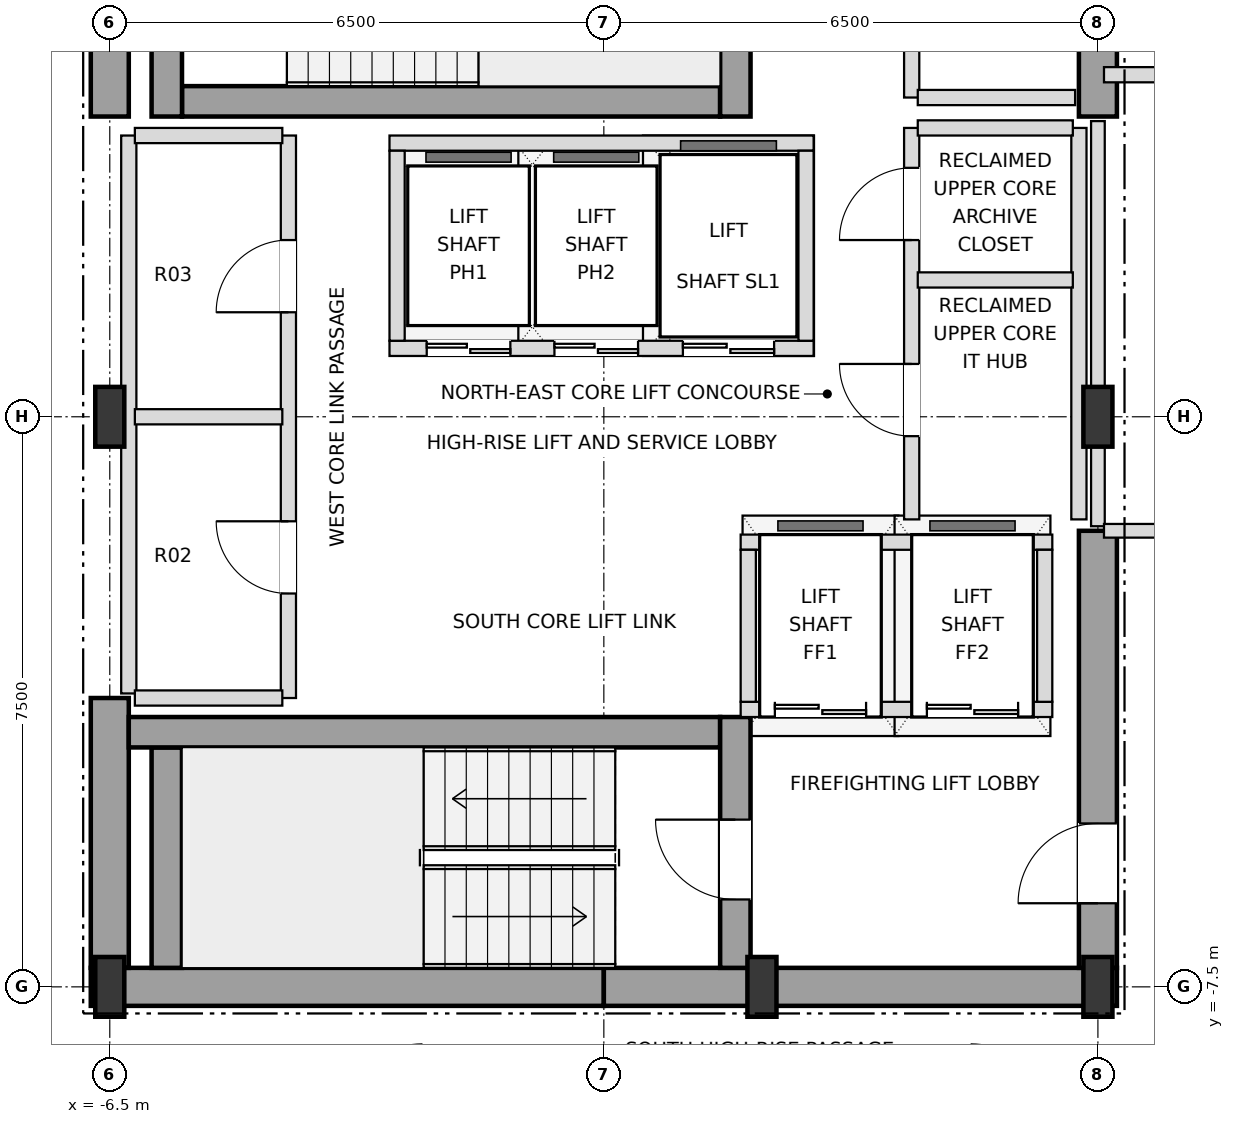
"""IFC4 building model, lengths in metres.
Left out: names, types, materials, properties, quantities, classifications, styles, units other than length and angle.
Written with IfcOpenShell. Run it as: python <this file> out.ifc"""

import sys

from ifc_helpers import new_model, si_unit, direction, frame, frame_2d, origin, origin_2d, place, context, subcontext, project, spatial, rectangle, i_section, extrude, element, fill, save


model = new_model("IFC4")
c1 = context("Model", 3, precision=1e-05, world=origin(), true_north=direction((0.0, 1.0)))
c2 = subcontext(c1, "Body", "Model", "MODEL_VIEW")
j1 = project(units=[si_unit("LENGTHUNIT", "METRE"), si_unit("PLANEANGLEUNIT", "RADIAN")], contexts=[c1])
p1 = place(None, origin())
s1 = spatial("IfcSite", under=j1, at=p1, CompositionType="ELEMENT")
p2 = place(p1, origin())
s2 = spatial("IfcBuilding", under=s1, at=p2, CompositionType="ELEMENT")
p3 = place(p2, frame((0.0, 0.0, 301.5)))
s3 = spatial("IfcBuildingStorey", under=s2, at=p3, CompositionType="ELEMENT", Elevation=301.5)
for number, where, z_axis, x_axis in (
    (1, (-6.5, -7.5, 0.0), (0.0, 0.0, 1.0), (1.0, 0.0, 0.0)),
    (2, (2.08, -7.5, 0.0), (0.0, 0.0, 1.0), (1.0, 0.0, 0.0)),
    (3, (6.5, -7.5, 0.0), (0.0, 0.0, 1.0), (1.0, 0.0, 0.0)),
    (4, (-6.5, 0.0, 0.0), (0.0, 0.0, 1.0), (1.0, 0.0, 0.0)),
    (5, (6.5, 0.0, 0.0), (0.0, 0.0, 1.0), (1.0, 0.0, 0.0)),
):
    element("IfcColumn", number, at=place(p3, frame(where, z_axis=z_axis, x_axis=x_axis)), inside=s3, PredefinedType="COLUMN", context=c2, shape_type="SweptSolid", body=[
        extrude(i_section(OverallWidth=0.382, OverallDepth=0.786, WebThickness=0.02, FlangeThickness=0.033, at=origin_2d()), origin(), (0.0, 0.0, 1.0), 3.6),
    ])
for number, where, z_axis, x_axis in (
    (6, (-6.75, -7.5, 0.0), (0.0, 0.0, 1.0), (1.0, 0.0, 0.0)),
    (7, (0.0, -7.5, 0.0), (0.0, 0.0, 1.0), (1.0, 0.0, 0.0)),
):
    element("IfcWall", number, at=place(p3, frame(where, z_axis=z_axis, x_axis=x_axis)), inside=s3, PredefinedType="SHEAR", context=c2, shape_type="SweptSolid", body=[
        extrude(rectangle(XDim=6.75, YDim=0.5, at=frame_2d((3.375, 0.0))), origin(), (0.0, 0.0, 1.0), 3.3),
    ])
p4 = place(p3, frame((-6.5, -7.25, 0.0), z_axis=(0.0, 0.0, 1.0), x_axis=(0.0, 1.0, 0.0)))
e8 = element("IfcWall", 8, at=p4, inside=s3, PredefinedType="SHEAR", context=c2, shape_type="SweptSolid", body=[
    extrude(rectangle(XDim=3.55, YDim=0.5, at=frame_2d((1.775, 0.0))), origin(), (0.0, 0.0, 1.0), 3.3),
])
p5 = place(p3, frame((-6.5, 3.95, 0.0), z_axis=(0.0, 0.0, 1.0), x_axis=(0.0, 1.0, 0.0)))
e9 = element("IfcWall", 9, at=p5, inside=s3, PredefinedType="SHEAR", context=c2, shape_type="SweptSolid", body=[
    extrude(rectangle(XDim=3.3, YDim=0.5, at=frame_2d((1.65, 0.0))), origin(), (0.0, 0.0, 1.0), 3.3),
])
p6 = place(p3, frame((6.5, -7.25, 0.0), z_axis=(0.0, 0.0, 1.0), x_axis=(0.0, 1.0, 0.0)))
e10 = element("IfcWall", 10, at=p6, inside=s3, PredefinedType="SHEAR", context=c2, shape_type="SweptSolid", body=[
    extrude(rectangle(XDim=5.75, YDim=0.5, at=frame_2d((2.875, 0.0))), origin(), (0.0, 0.0, 1.0), 3.3),
])
p7 = place(p6, frame((0.85, 0.0, 0.0)))
e11 = element("IfcOpeningElement", 11, at=p7, cuts=e10, PredefinedType="OPENING", context=c2, shape_type="SweptSolid", body=[
    extrude(rectangle(XDim=1.05, YDim=2.15, at=frame_2d((0.525, 1.075))), frame((0.0, 0.26, 0.0), z_axis=(0.0, -1.0, 0.0), x_axis=(1.0, 0.0, 0.0)), (0.0, 0.0, 1.0), 0.52),
])
p8 = place(p3, frame((6.5, 3.95, 0.0), z_axis=(0.0, 0.0, 1.0), x_axis=(0.0, 1.0, 0.0)))
e12 = element("IfcWall", 12, at=p8, inside=s3, PredefinedType="SHEAR", context=c2, shape_type="SweptSolid", body=[
    extrude(rectangle(XDim=3.3, YDim=0.5, at=frame_2d((1.65, 0.0))), origin(), (0.0, 0.0, 1.0), 3.3),
])
p9 = place(p3, frame((-5.75, -7.25, 0.0), z_axis=(0.0, 0.0, 1.0), x_axis=(0.0, 1.0, 0.0)))
e13 = element("IfcWall", 13, at=p9, inside=s3, PredefinedType="SHEAR", context=c2, shape_type="SweptSolid", body=[
    extrude(rectangle(XDim=2.9, YDim=0.4, at=frame_2d((1.45, 0.0))), origin(), (0.0, 0.0, 1.0), 3.3),
])
p10 = place(p3, frame((-6.25, -4.15, 0.0), z_axis=(0.0, 0.0, 1.0), x_axis=(1.0, 0.0, 0.0)))
e14 = element("IfcWall", 14, at=p10, inside=s3, PredefinedType="SHEAR", context=c2, shape_type="SweptSolid", body=[
    extrude(rectangle(XDim=7.78, YDim=0.4, at=frame_2d((3.89, 0.0))), origin(), (0.0, 0.0, 1.0), 3.3),
])
p11 = place(p3, frame((1.73, -7.25, 0.0), z_axis=(0.0, 0.0, 1.0), x_axis=(0.0, 1.0, 0.0)))
e15 = element("IfcWall", 15, at=p11, inside=s3, PredefinedType="SHEAR", context=c2, shape_type="SweptSolid", body=[
    extrude(rectangle(XDim=3.3, YDim=0.4, at=frame_2d((1.65, 0.0))), origin(), (0.0, 0.0, 1.0), 3.3),
])
p12 = place(p11, frame((0.9, 0.0, 0.0)))
e16 = element("IfcOpeningElement", 16, at=p12, cuts=e15, PredefinedType="OPENING", context=c2, shape_type="SweptSolid", body=[
    extrude(rectangle(XDim=1.05, YDim=2.15, at=frame_2d((0.525, 1.075))), frame((0.0, 0.21, 0.0), z_axis=(0.0, -1.0, 0.0), x_axis=(1.0, 0.0, 0.0)), (0.0, 0.0, 1.0), 0.42),
])
p13 = place(p3, frame((-5.55, 4.15, 0.0), z_axis=(0.0, 0.0, 1.0), x_axis=(1.0, 0.0, 0.0)))
e17 = element("IfcWall", 17, at=p13, inside=s3, PredefinedType="SHEAR", context=c2, shape_type="SweptSolid", body=[
    extrude(rectangle(XDim=7.08, YDim=0.4, at=frame_2d((3.54, 0.0))), origin(), (0.0, 0.0, 1.0), 3.3),
])
for number, where, z_axis, x_axis in (
    (18, (1.73, 3.95, 0.0), (0.0, 0.0, 1.0), (0.0, 1.0, 0.0)),
    (19, (-5.75, 3.95, 0.0), (0.0, 0.0, 1.0), (0.0, 1.0, 0.0)),
):
    element("IfcWall", number, at=place(p3, frame(where, z_axis=z_axis, x_axis=x_axis)), inside=s3, PredefinedType="SHEAR", context=c2, shape_type="SweptSolid", body=[
        extrude(rectangle(XDim=3.3, YDim=0.4, at=frame_2d((1.65, 0.0))), origin(), (0.0, 0.0, 1.0), 3.3),
    ])
p14 = place(p3, frame((-2.82, 0.9, 0.0), z_axis=(0.0, 0.0, 1.0), x_axis=(1.0, 0.0, 0.0)))
e20 = element("IfcWall", 20, at=p14, inside=s3, PredefinedType="SOLIDWALL", context=c2, shape_type="SweptSolid", body=[
    extrude(rectangle(XDim=5.58, YDim=0.2, at=frame_2d((2.79, 0.0))), origin(), (0.0, 0.0, 1.0), 3.3),
])
p15 = place(p14, frame((0.49, 0.0, 0.0)))
e21 = element("IfcOpeningElement", 21, at=p15, cuts=e20, PredefinedType="OPENING", context=c2, shape_type="SweptSolid", body=[
    extrude(rectangle(XDim=1.1, YDim=2.15, at=frame_2d((0.55, 1.075))), frame((0.0, 0.11, 0.0), z_axis=(0.0, -1.0, 0.0), x_axis=(1.0, 0.0, 0.0)), (0.0, 0.0, 1.0), 0.22),
])
p16 = place(p14, frame((2.17, 0.0, 0.0)))
e22 = element("IfcOpeningElement", 22, at=p16, cuts=e20, PredefinedType="OPENING", context=c2, shape_type="SweptSolid", body=[
    extrude(rectangle(XDim=1.1, YDim=2.15, at=frame_2d((0.55, 1.075))), frame((0.0, 0.11, 0.0), z_axis=(0.0, -1.0, 0.0), x_axis=(1.0, 0.0, 0.0)), (0.0, 0.0, 1.0), 0.22),
])
p17 = place(p14, frame((3.86, 0.0, 0.0)))
e23 = element("IfcOpeningElement", 23, at=p17, cuts=e20, PredefinedType="OPENING", context=c2, shape_type="SweptSolid", body=[
    extrude(rectangle(XDim=1.2, YDim=2.2, at=frame_2d((0.6, 1.1))), frame((0.0, 0.11, 0.0), z_axis=(0.0, -1.0, 0.0), x_axis=(1.0, 0.0, 0.0)), (0.0, 0.0, 1.0), 0.22),
])
p18 = place(p3, frame((-2.82, 3.6, 0.0), z_axis=(0.0, 0.0, 1.0), x_axis=(1.0, 0.0, 0.0)))
e24 = element("IfcWall", 24, at=p18, inside=s3, PredefinedType="SOLIDWALL", context=c2, shape_type="SweptSolid", body=[
    extrude(rectangle(XDim=5.58, YDim=0.2, at=frame_2d((2.79, 0.0))), origin(), (0.0, 0.0, 1.0), 3.3),
])
for number, where, z_axis, x_axis in (
    (25, (-2.72, 1.0, 0.0), (0.0, 0.0, 1.0), (0.0, 1.0, 0.0)),
    (26, (2.66, 1.0, 0.0), (0.0, 0.0, 1.0), (0.0, 1.0, 0.0)),
):
    element("IfcWall", number, at=place(p3, frame(where, z_axis=z_axis, x_axis=x_axis)), inside=s3, PredefinedType="SOLIDWALL", context=c2, shape_type="SweptSolid", body=[
        extrude(rectangle(XDim=2.5, YDim=0.2, at=frame_2d((1.25, 0.0))), origin(), (0.0, 0.0, 1.0), 3.3),
    ])
p19 = place(p3, frame((1.8, -3.85, 0.0), z_axis=(0.0, 0.0, 1.0), x_axis=(1.0, 0.0, 0.0)))
e27 = element("IfcWall", 27, at=p19, inside=s3, PredefinedType="SOLIDWALL", context=c2, shape_type="SweptSolid", body=[
    extrude(rectangle(XDim=4.1, YDim=0.2, at=frame_2d((2.05, 0.0))), origin(), (0.0, 0.0, 1.0), 3.3),
])
p20 = place(p19, frame((0.45, 0.0, 0.0)))
e28 = element("IfcOpeningElement", 28, at=p20, cuts=e27, PredefinedType="OPENING", context=c2, shape_type="SweptSolid", body=[
    extrude(rectangle(XDim=1.2, YDim=2.2, at=frame_2d((0.6, 1.1))), frame((0.0, 0.11, 0.0), z_axis=(0.0, -1.0, 0.0), x_axis=(1.0, 0.0, 0.0)), (0.0, 0.0, 1.0), 0.22),
])
p21 = place(p19, frame((2.45, 0.0, 0.0)))
e29 = element("IfcOpeningElement", 29, at=p21, cuts=e27, PredefinedType="OPENING", context=c2, shape_type="SweptSolid", body=[
    extrude(rectangle(XDim=1.2, YDim=2.2, at=frame_2d((0.6, 1.1))), frame((0.0, 0.11, 0.0), z_axis=(0.0, -1.0, 0.0), x_axis=(1.0, 0.0, 0.0)), (0.0, 0.0, 1.0), 0.22),
])
p22 = place(p3, frame((1.8, -1.65, 0.0), z_axis=(0.0, 0.0, 1.0), x_axis=(1.0, 0.0, 0.0)))
e30 = element("IfcWall", 30, at=p22, inside=s3, PredefinedType="SOLIDWALL", context=c2, shape_type="SweptSolid", body=[
    extrude(rectangle(XDim=4.1, YDim=0.2, at=frame_2d((2.05, 0.0))), origin(), (0.0, 0.0, 1.0), 3.3),
])
for number, where, z_axis, x_axis in (
    (31, (1.9, -3.75, 0.0), (0.0, 0.0, 1.0), (0.0, 1.0, 0.0)),
    (32, (5.8, -3.75, 0.0), (0.0, 0.0, 1.0), (0.0, 1.0, 0.0)),
):
    element("IfcWall", number, at=place(p3, frame(where, z_axis=z_axis, x_axis=x_axis)), inside=s3, PredefinedType="SOLIDWALL", context=c2, shape_type="SweptSolid", body=[
        extrude(rectangle(XDim=2.0, YDim=0.2, at=frame_2d((1.0, 0.0))), origin(), (0.0, 0.0, 1.0), 3.3),
    ])
p23 = place(p3, frame((-6.25, -3.64, 0.0), z_axis=(0.0, 0.0, 1.0), x_axis=(0.0, 1.0, 0.0)))
e33 = element("IfcWall", 33, at=p23, inside=s3, PredefinedType="SOLIDWALL", context=c2, shape_type="SweptSolid", body=[
    extrude(rectangle(XDim=7.34, YDim=0.2, at=frame_2d((3.67, 0.0))), origin(), (0.0, 0.0, 1.0), 2.353),
])
p24 = place(p3, frame((-4.15, -3.7, 0.0), z_axis=(0.0, 0.0, 1.0), x_axis=(0.0, 1.0, 0.0)))
e34 = element("IfcWall", 34, at=p24, inside=s3, PredefinedType="SOLIDWALL", context=c2, shape_type="SweptSolid", body=[
    extrude(rectangle(XDim=7.4, YDim=0.2, at=frame_2d((3.7, 0.0))), origin(), (0.0, 0.0, 1.0), 3.3),
])
p25 = place(p24, frame((1.375, 0.0, 0.0)))
e35 = element("IfcOpeningElement", 35, at=p25, cuts=e34, PredefinedType="OPENING", context=c2, shape_type="SweptSolid", body=[
    extrude(rectangle(XDim=0.95, YDim=2.15, at=frame_2d((0.475, 1.075))), frame((0.0, 0.11, 0.0), z_axis=(0.0, -1.0, 0.0), x_axis=(1.0, 0.0, 0.0)), (0.0, 0.0, 1.0), 0.22),
])
p26 = place(p24, frame((5.075, 0.0, 0.0)))
e36 = element("IfcOpeningElement", 36, at=p26, cuts=e34, PredefinedType="OPENING", context=c2, shape_type="SweptSolid", body=[
    extrude(rectangle(XDim=0.95, YDim=2.15, at=frame_2d((0.475, 1.075))), frame((0.0, 0.11, 0.0), z_axis=(0.0, -1.0, 0.0), x_axis=(1.0, 0.0, 0.0)), (0.0, 0.0, 1.0), 0.22),
])
p27 = place(p3, frame((4.05, -1.35, 0.0), z_axis=(0.0, 0.0, 1.0), x_axis=(0.0, 1.0, 0.0)))
e37 = element("IfcWall", 37, at=p27, inside=s3, PredefinedType="SOLIDWALL", context=c2, shape_type="SweptSolid", body=[
    extrude(rectangle(XDim=5.15, YDim=0.2, at=frame_2d((2.575, 0.0))), origin(), (0.0, 0.0, 1.0), 3.3),
])
p28 = place(p27, frame((1.095, 0.0, 0.0)))
e38 = element("IfcOpeningElement", 38, at=p28, cuts=e37, PredefinedType="OPENING", context=c2, shape_type="SweptSolid", body=[
    extrude(rectangle(XDim=0.95, YDim=2.15, at=frame_2d((0.475, 1.075))), frame((0.0, 0.11, 0.0), z_axis=(0.0, -1.0, 0.0), x_axis=(1.0, 0.0, 0.0)), (0.0, 0.0, 1.0), 0.22),
])
p29 = place(p27, frame((3.675, 0.0, 0.0)))
e39 = element("IfcOpeningElement", 39, at=p29, cuts=e37, PredefinedType="OPENING", context=c2, shape_type="SweptSolid", body=[
    extrude(rectangle(XDim=0.95, YDim=2.15, at=frame_2d((0.475, 1.075))), frame((0.0, 0.11, 0.0), z_axis=(0.0, -1.0, 0.0), x_axis=(1.0, 0.0, 0.0)), (0.0, 0.0, 1.0), 0.22),
])
p30 = place(p3, frame((4.05, 4.2, 0.0), z_axis=(0.0, 0.0, 1.0), x_axis=(0.0, 1.0, 0.0)))
e40 = element("IfcWall", 40, at=p30, inside=s3, PredefinedType="SOLIDWALL", context=c2, shape_type="SweptSolid", body=[
    extrude(rectangle(XDim=3.05, YDim=0.2, at=frame_2d((1.525, 0.0))), origin(), (0.0, 0.0, 1.0), 3.3),
])
p31 = place(p30, frame((0.975, 0.0, 0.0)))
e41 = element("IfcOpeningElement", 41, at=p31, cuts=e40, PredefinedType="OPENING", context=c2, shape_type="SweptSolid", body=[
    extrude(rectangle(XDim=0.95, YDim=2.15, at=frame_2d((0.475, 1.075))), frame((0.0, 0.11, 0.0), z_axis=(0.0, -1.0, 0.0), x_axis=(1.0, 0.0, 0.0)), (0.0, 0.0, 1.0), 0.22),
])
p32 = place(p3, frame((6.25, -1.35, 0.0), z_axis=(0.0, 0.0, 1.0), x_axis=(0.0, 1.0, 0.0)))
e42 = element("IfcWall", 42, at=p32, inside=s3, PredefinedType="SOLIDWALL", context=c2, shape_type="SweptSolid", body=[
    extrude(rectangle(XDim=5.15, YDim=0.2, at=frame_2d((2.575, 0.0))), origin(), (0.0, 0.0, 1.0), 2.353),
])
p33 = place(p3, frame((6.5, -1.44, 0.0), z_axis=(0.0, 0.0, 1.0), x_axis=(0.0, 1.0, 0.0)))
e43 = element("IfcWall", 43, at=p33, inside=s3, PredefinedType="PARTITIONING", context=c2, shape_type="SweptSolid", body=[
    extrude(rectangle(XDim=5.33, YDim=0.18, at=frame_2d((2.665, 0.0))), origin(), (0.0, 0.0, 1.0), 2.353),
])
p34 = place(p3, frame((-6.17, -3.7, 0.0), z_axis=(0.0, 0.0, 1.0), x_axis=(1.0, 0.0, 0.0)))
e44 = element("IfcWall", 44, at=p34, inside=s3, PredefinedType="SOLIDWALL", context=c2, shape_type="SweptSolid", body=[
    extrude(rectangle(XDim=1.94, YDim=0.2, at=frame_2d((0.97, 0.0))), origin(), (0.0, 0.0, 1.0), 3.3),
])
p35 = place(p3, frame((6.58, -1.5, 0.0), z_axis=(0.0, 0.0, 1.0), x_axis=(1.0, 0.0, 0.0)))
e45 = element("IfcWall", 45, at=p35, inside=s3, PredefinedType="PARTITIONING", context=c2, shape_type="SweptSolid", body=[
    extrude(rectangle(XDim=1.64, YDim=0.18, at=frame_2d((0.82, 0.0))), origin(), (0.0, 0.0, 1.0), 3.3),
])
p36 = place(p3, frame((-6.17, 0.0, 0.0), z_axis=(0.0, 0.0, 1.0), x_axis=(1.0, 0.0, 0.0)))
e46 = element("IfcWall", 46, at=p36, inside=s3, PredefinedType="SOLIDWALL", context=c2, shape_type="SweptSolid", body=[
    extrude(rectangle(XDim=1.94, YDim=0.2, at=frame_2d((0.97, 0.0))), origin(), (0.0, 0.0, 1.0), 3.3),
])
p37 = place(p3, frame((4.13, 1.8, 0.0), z_axis=(0.0, 0.0, 1.0), x_axis=(1.0, 0.0, 0.0)))
e47 = element("IfcWall", 47, at=p37, inside=s3, PredefinedType="SOLIDWALL", context=c2, shape_type="SweptSolid", body=[
    extrude(rectangle(XDim=2.04, YDim=0.2, at=frame_2d((1.02, 0.0))), origin(), (0.0, 0.0, 1.0), 3.3),
])
p38 = place(p3, frame((-6.17, 3.7, 0.0), z_axis=(0.0, 0.0, 1.0), x_axis=(1.0, 0.0, 0.0)))
e48 = element("IfcWall", 48, at=p38, inside=s3, PredefinedType="SOLIDWALL", context=c2, shape_type="SweptSolid", body=[
    extrude(rectangle(XDim=1.94, YDim=0.2, at=frame_2d((0.97, 0.0))), origin(), (0.0, 0.0, 1.0), 3.3),
])
p39 = place(p3, frame((4.13, 3.8, 0.0), z_axis=(0.0, 0.0, 1.0), x_axis=(1.0, 0.0, 0.0)))
e49 = element("IfcWall", 49, at=p39, inside=s3, PredefinedType="SOLIDWALL", context=c2, shape_type="SweptSolid", body=[
    extrude(rectangle(XDim=2.04, YDim=0.2, at=frame_2d((1.02, 0.0))), origin(), (0.0, 0.0, 1.0), 3.3),
])
p40 = place(p3, frame((4.13, 4.2, 0.0), z_axis=(0.0, 0.0, 1.0), x_axis=(1.0, 0.0, 0.0)))
e50 = element("IfcWall", 50, at=p40, inside=s3, PredefinedType="SOLIDWALL", context=c2, shape_type="SweptSolid", body=[
    extrude(rectangle(XDim=2.07, YDim=0.2, at=frame_2d((1.035, 0.0))), origin(), (0.0, 0.0, 1.0), 3.3),
])
p41 = place(p3, frame((6.58, 4.5, 0.0), z_axis=(0.0, 0.0, 1.0), x_axis=(1.0, 0.0, 0.0)))
e51 = element("IfcWall", 51, at=p41, inside=s3, PredefinedType="SOLIDWALL", context=c2, shape_type="SweptSolid", body=[
    extrude(rectangle(XDim=4.74, YDim=0.2, at=frame_2d((2.37, 0.0))), origin(), (0.0, 0.0, 1.0), 3.3),
])
p42 = place(p41, frame((1.845, 0.0, 0.0)))
e52 = element("IfcOpeningElement", 52, at=p42, cuts=e51, PredefinedType="OPENING", context=c2, shape_type="SweptSolid", body=[
    extrude(rectangle(XDim=0.95, YDim=2.15, at=frame_2d((0.475, 1.075))), frame((0.0, 0.11, 0.0), z_axis=(0.0, -1.0, 0.0), x_axis=(1.0, 0.0, 0.0)), (0.0, 0.0, 1.0), 0.22),
])
p43 = place(p7, origin())
e53 = element("IfcDoor", 53, at=p43, inside=s3, OperationType="SINGLE_SWING_LEFT", PredefinedType="DOOR", context=c2, shape_type="SweptSolid", body=[
    extrude(rectangle(XDim=1.05, YDim=2.15, at=frame_2d((0.525, 1.075))), frame((0.0, 0.025, 0.0), z_axis=(0.0, -1.0, 0.0), x_axis=(1.0, 0.0, 0.0)), (0.0, 0.0, 1.0), 0.05),
])
fill(e11, e53)
p44 = place(p12, origin())
e54 = element("IfcDoor", 54, at=p44, inside=s3, OperationType="SINGLE_SWING_RIGHT", PredefinedType="DOOR", context=c2, shape_type="SweptSolid", body=[
    extrude(rectangle(XDim=1.05, YDim=2.15, at=frame_2d((0.525, 1.075))), frame((0.0, 0.025, 0.0), z_axis=(0.0, -1.0, 0.0), x_axis=(1.0, 0.0, 0.0)), (0.0, 0.0, 1.0), 0.05),
])
fill(e16, e54)
p45 = place(p15, origin())
e55 = element("IfcDoor", 55, at=p45, inside=s3, OperationType="DOUBLE_DOOR_SLIDING", PredefinedType="DOOR", context=c2, shape_type="SweptSolid", body=[
    extrude(rectangle(XDim=1.1, YDim=2.15, at=frame_2d((0.55, 1.075))), frame((0.0, 0.025, 0.0), z_axis=(0.0, -1.0, 0.0), x_axis=(1.0, 0.0, 0.0)), (0.0, 0.0, 1.0), 0.05),
])
fill(e21, e55)
p46 = place(p16, origin())
e56 = element("IfcDoor", 56, at=p46, inside=s3, OperationType="DOUBLE_DOOR_SLIDING", PredefinedType="DOOR", context=c2, shape_type="SweptSolid", body=[
    extrude(rectangle(XDim=1.1, YDim=2.15, at=frame_2d((0.55, 1.075))), frame((0.0, 0.025, 0.0), z_axis=(0.0, -1.0, 0.0), x_axis=(1.0, 0.0, 0.0)), (0.0, 0.0, 1.0), 0.05),
])
fill(e22, e56)
p47 = place(p17, origin())
e57 = element("IfcDoor", 57, at=p47, inside=s3, OperationType="DOUBLE_DOOR_SLIDING", PredefinedType="DOOR", context=c2, shape_type="SweptSolid", body=[
    extrude(rectangle(XDim=1.2, YDim=2.2, at=frame_2d((0.6, 1.1))), frame((0.0, 0.025, 0.0), z_axis=(0.0, -1.0, 0.0), x_axis=(1.0, 0.0, 0.0)), (0.0, 0.0, 1.0), 0.05),
])
fill(e23, e57)
p48 = place(p20, origin())
e58 = element("IfcDoor", 58, at=p48, inside=s3, OperationType="DOUBLE_DOOR_SLIDING", PredefinedType="DOOR", context=c2, shape_type="SweptSolid", body=[
    extrude(rectangle(XDim=1.2, YDim=2.2, at=frame_2d((0.6, 1.1))), frame((0.0, 0.025, 0.0), z_axis=(0.0, -1.0, 0.0), x_axis=(1.0, 0.0, 0.0)), (0.0, 0.0, 1.0), 0.05),
])
fill(e28, e58)
p49 = place(p21, origin())
e59 = element("IfcDoor", 59, at=p49, inside=s3, OperationType="DOUBLE_DOOR_SLIDING", PredefinedType="DOOR", context=c2, shape_type="SweptSolid", body=[
    extrude(rectangle(XDim=1.2, YDim=2.2, at=frame_2d((0.6, 1.1))), frame((0.0, 0.025, 0.0), z_axis=(0.0, -1.0, 0.0), x_axis=(1.0, 0.0, 0.0)), (0.0, 0.0, 1.0), 0.05),
])
fill(e29, e59)
p50 = place(p25, origin())
e60 = element("IfcDoor", 60, at=p50, inside=s3, OperationType="SINGLE_SWING_RIGHT", PredefinedType="DOOR", context=c2, shape_type="SweptSolid", body=[
    extrude(rectangle(XDim=0.95, YDim=2.15, at=frame_2d((0.475, 1.075))), frame((0.0, 0.025, 0.0), z_axis=(0.0, -1.0, 0.0), x_axis=(1.0, 0.0, 0.0)), (0.0, 0.0, 1.0), 0.05),
])
fill(e35, e60)
p51 = place(p26, origin())
e61 = element("IfcDoor", 61, at=p51, inside=s3, OperationType="SINGLE_SWING_LEFT", PredefinedType="DOOR", context=c2, shape_type="SweptSolid", body=[
    extrude(rectangle(XDim=0.95, YDim=2.15, at=frame_2d((0.475, 1.075))), frame((0.0, 0.025, 0.0), z_axis=(0.0, -1.0, 0.0), x_axis=(1.0, 0.0, 0.0)), (0.0, 0.0, 1.0), 0.05),
])
fill(e36, e61)
p52 = place(p28, origin())
e62 = element("IfcDoor", 62, at=p52, inside=s3, OperationType="SINGLE_SWING_RIGHT", PredefinedType="DOOR", context=c2, shape_type="SweptSolid", body=[
    extrude(rectangle(XDim=0.95, YDim=2.15, at=frame_2d((0.475, 1.075))), frame((0.0, 0.025, 0.0), z_axis=(0.0, -1.0, 0.0), x_axis=(1.0, 0.0, 0.0)), (0.0, 0.0, 1.0), 0.05),
])
fill(e38, e62)
p53 = place(p29, origin())
e63 = element("IfcDoor", 63, at=p53, inside=s3, OperationType="SINGLE_SWING_LEFT", PredefinedType="DOOR", context=c2, shape_type="SweptSolid", body=[
    extrude(rectangle(XDim=0.95, YDim=2.15, at=frame_2d((0.475, 1.075))), frame((0.0, 0.025, 0.0), z_axis=(0.0, -1.0, 0.0), x_axis=(1.0, 0.0, 0.0)), (0.0, 0.0, 1.0), 0.05),
])
fill(e39, e63)
save(model, sys.argv[1])
